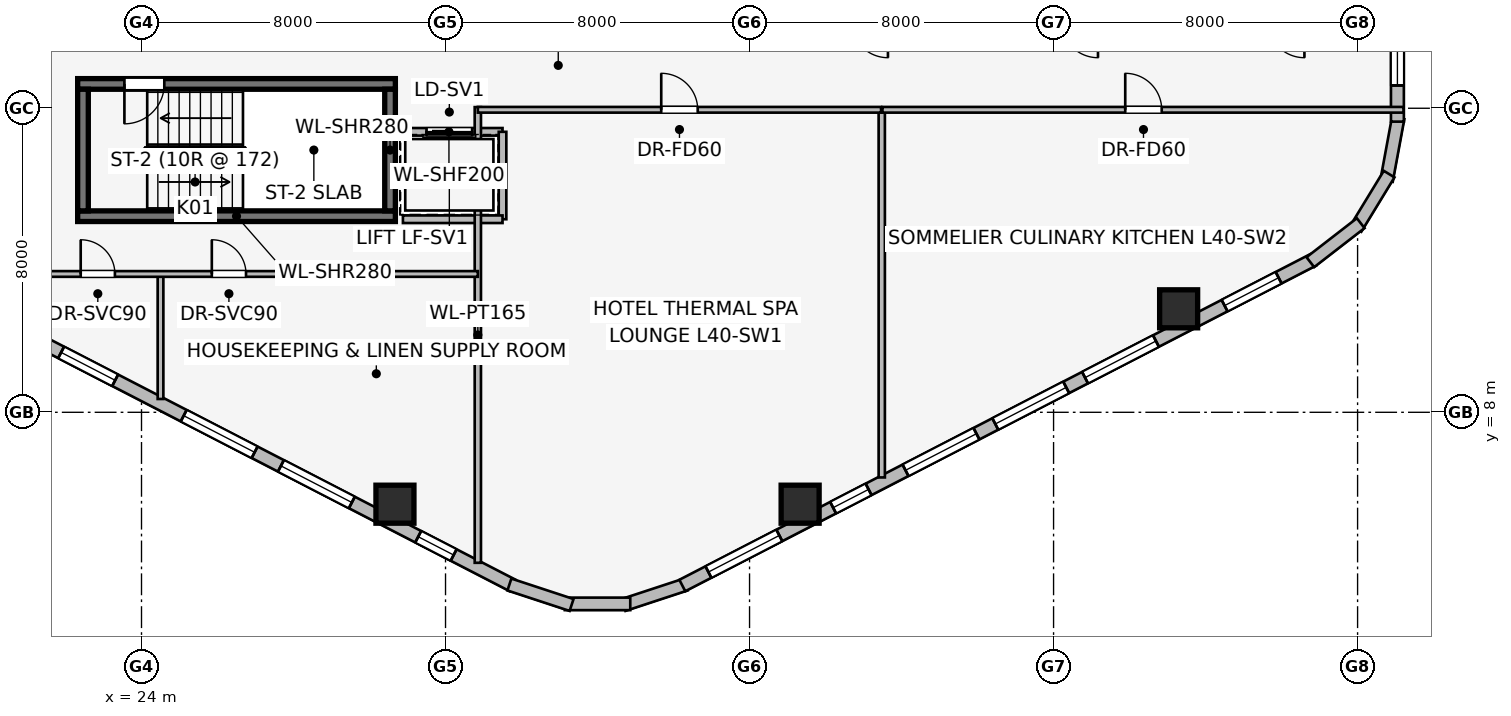
"""IFC4 building model, lengths in metres.
Left out: names, types, materials, properties, quantities, classifications, styles, units other than length and angle.
Written with IfcOpenShell. Run it as: python <this file> out.ifc"""

import sys

from ifc_helpers import new_model, si_unit, direction, frame, frame_2d, origin, origin_2d, place, context, subcontext, project, spatial, rectangle, extrude, element, fill, save


model = new_model("IFC4")
c1 = context("Model", 3, precision=1e-05, world=origin(), true_north=direction((0.0, 1.0)))
c2 = subcontext(c1, "Body", "Model", "MODEL_VIEW")
j1 = project(units=[si_unit("LENGTHUNIT", "METRE"), si_unit("PLANEANGLEUNIT", "RADIAN")], contexts=[c1])
p1 = place(None, origin())
s1 = spatial("IfcSite", under=j1, at=p1, CompositionType="ELEMENT")
p2 = place(p1, origin())
s2 = spatial("IfcBuilding", under=s1, at=p2, CompositionType="ELEMENT")
p3 = place(p2, frame((0.0, 0.0, 149.85)))
s3 = spatial("IfcBuildingStorey", under=s2, at=p3, CompositionType="ELEMENT", Elevation=149.85)
p4 = place(p3, frame((22.32, 13.16, 0.0), z_axis=(0.0, 0.0, 1.0), x_axis=(1.0, 0.0, 0.0)))
e1 = element("IfcWall", 1, at=p4, inside=s3, PredefinedType="SHEAR", context=c2, shape_type="SweptSolid", body=[
    extrude(rectangle(XDim=8.36, YDim=0.28, at=frame_2d((4.18, 0.0))), origin(), (0.0, 0.0, 1.0), 3.45),
])
p5 = place(p3, frame((30.68, 16.64, 0.0), z_axis=(0.0, 0.0, 1.0), x_axis=(-1.0, 0.0, 0.0)))
e2 = element("IfcWall", 2, at=p5, inside=s3, PredefinedType="SHEAR", context=c2, shape_type="SweptSolid", body=[
    extrude(rectangle(XDim=8.36, YDim=0.28, at=frame_2d((4.18, 0.0))), origin(), (0.0, 0.0, 1.0), 3.45),
])
p6 = place(p5, frame((6.08, 0.0, 0.0)))
e3 = element("IfcOpeningElement", 3, at=p6, cuts=e2, PredefinedType="OPENING", context=c2, shape_type="SweptSolid", body=[
    extrude(rectangle(XDim=1.05, YDim=2.0, at=frame_2d((0.525, 1.0))), frame((0.0, 0.15, 0.0), z_axis=(0.0, -1.0, 0.0), x_axis=(1.0, 0.0, 0.0)), (0.0, 0.0, 1.0), 0.3),
])
for number, where, z_axis, x_axis in (
    (4, (22.46, 16.5, 0.0), (0.0, 0.0, 1.0), (0.0, -1.0, 0.0)),
    (5, (30.54, 13.3, 0.0), (0.0, 0.0, 1.0), (0.0, 1.0, 0.0)),
):
    element("IfcWall", number, at=place(p3, frame(where, z_axis=z_axis, x_axis=x_axis)), inside=s3, PredefinedType="SHEAR", context=c2, shape_type="SweptSolid", body=[
        extrude(rectangle(XDim=3.2, YDim=0.28, at=frame_2d((1.6, 0.0))), origin(), (0.0, 0.0, 1.0), 3.45),
    ])
for number, where, z_axis, x_axis in (
    (6, (30.669, 5.582, 0.0), (0.0, 0.0, 1.0), (1.0, 0.0, 0.0)),
    (7, (41.331, 5.582, 0.0), (0.0, 0.0, 1.0), (1.0, 0.0, 0.0)),
    (8, (51.291, 10.723, 0.0), (0.0, 0.0, 1.0), (1.0, 0.0, 0.0)),
):
    element("IfcColumn", number, at=place(p3, frame(where, z_axis=z_axis, x_axis=x_axis)), inside=s3, PredefinedType="COLUMN", context=c2, shape_type="SweptSolid", body=[
        extrude(rectangle(XDim=1.0, YDim=1.0, at=origin_2d()), origin(), (0.0, 0.0, 1.0), 3.45),
    ])
p7 = place(p3, frame((33.769, 3.442, 0.0), z_axis=(0.0, 0.0, 1.0), x_axis=(-0.888613612362, 0.458656568606, 0.0)))
e9 = element("IfcWall", 9, at=p7, inside=s3, PredefinedType="STANDARD", context=c2, shape_type="SweptSolid", body=[
    extrude(rectangle(XDim=18.681, YDim=0.34, at=frame_2d((9.34, 0.0))), origin(), (0.0, 0.0, 1.0), 3.19),
])
p8 = place(p7, frame((1.75, 0.0, 0.75)))
e10 = element("IfcOpeningElement", 10, at=p8, cuts=e9, PredefinedType="OPENING", context=c2, shape_type="SweptSolid", body=[
    extrude(rectangle(XDim=1.05, YDim=1.4, at=frame_2d((0.525, 0.7))), frame((0.0, 0.18, 0.0), z_axis=(0.0, -1.0, 0.0), x_axis=(1.0, 0.0, 0.0)), (0.0, 0.0, 1.0), 0.36),
])
p9 = place(p7, frame((4.765, 0.0, 0.75)))
e11 = element("IfcOpeningElement", 11, at=p9, cuts=e9, PredefinedType="OPENING", context=c2, shape_type="SweptSolid", body=[
    extrude(rectangle(XDim=2.1, YDim=1.5, at=frame_2d((1.05, 0.75))), frame((0.0, 0.18, 0.0), z_axis=(0.0, -1.0, 0.0), x_axis=(1.0, 0.0, 0.0)), (0.0, 0.0, 1.0), 0.36),
])
p10 = place(p7, frame((7.644, 0.0, 0.75)))
e12 = element("IfcOpeningElement", 12, at=p10, cuts=e9, PredefinedType="OPENING", context=c2, shape_type="SweptSolid", body=[
    extrude(rectangle(XDim=2.1, YDim=1.5, at=frame_2d((1.05, 0.75))), frame((0.0, 0.18, 0.0), z_axis=(0.0, -1.0, 0.0), x_axis=(1.0, 0.0, 0.0)), (0.0, 0.0, 1.0), 0.36),
])
p11 = place(p7, frame((11.774, 0.0, 0.75)))
e13 = element("IfcOpeningElement", 13, at=p11, cuts=e9, PredefinedType="OPENING", context=c2, shape_type="SweptSolid", body=[
    extrude(rectangle(XDim=1.6, YDim=1.55, at=frame_2d((0.8, 0.775))), frame((0.0, 0.18, 0.0), z_axis=(0.0, -1.0, 0.0), x_axis=(1.0, 0.0, 0.0)), (0.0, 0.0, 1.0), 0.36),
])
p12 = place(p7, frame((15.92, 0.0, 0.75)))
e14 = element("IfcOpeningElement", 14, at=p12, cuts=e9, PredefinedType="OPENING", context=c2, shape_type="SweptSolid", body=[
    extrude(rectangle(XDim=1.05, YDim=1.4, at=frame_2d((0.525, 0.7))), frame((0.0, 0.18, 0.0), z_axis=(0.0, -1.0, 0.0), x_axis=(1.0, 0.0, 0.0)), (0.0, 0.0, 1.0), 0.36),
])
for number, where, z_axis, x_axis in (
    (15, (38.319, 3.468, 0.0), (0.0, 0.0, 1.0), (-0.95, -0.312, 0.0)),
    (16, (36.861, 2.959, 0.0), (0.0, 0.0, 1.0), (-1.0, 0.0, 0.0)),
    (17, (35.317, 2.93, 0.0), (0.0, 0.0, 1.0), (-0.95, 0.312, 0.0)),
):
    element("IfcWall", number, at=place(p3, frame(where, z_axis=z_axis, x_axis=x_axis)), inside=s3, PredefinedType="STANDARD", context=c2, shape_type="SweptSolid", body=[
        extrude(rectangle(XDim=1.722, YDim=0.33, at=frame_2d((0.861, 0.0))), origin(), (0.0, 0.0, 1.0), 3.19),
    ])
p13 = place(p3, frame((54.831, 12.01, 0.0), z_axis=(0.0, 0.0, 1.0), x_axis=(-0.888613612362, -0.458656568606, 0.0)))
e18 = element("IfcWall", 18, at=p13, inside=s3, PredefinedType="STANDARD", context=c2, shape_type="SweptSolid", body=[
    extrude(rectangle(XDim=18.681, YDim=0.34, at=frame_2d((9.34, 0.0))), origin(), (0.0, 0.0, 1.0), 3.19),
])
p14 = place(p13, frame((1.023, 0.0, 0.75)))
e19 = element("IfcOpeningElement", 19, at=p14, cuts=e18, PredefinedType="OPENING", context=c2, shape_type="SweptSolid", body=[
    extrude(rectangle(XDim=1.6, YDim=1.55, at=frame_2d((0.8, 0.775))), frame((0.0, 0.18, 0.0), z_axis=(0.0, -1.0, 0.0), x_axis=(1.0, 0.0, 0.0)), (0.0, 0.0, 1.0), 0.36),
])
p15 = place(p13, frame((4.655, 0.0, 0.75)))
e20 = element("IfcOpeningElement", 20, at=p15, cuts=e18, PredefinedType="OPENING", context=c2, shape_type="SweptSolid", body=[
    extrude(rectangle(XDim=2.1, YDim=1.5, at=frame_2d((1.05, 0.75))), frame((0.0, 0.18, 0.0), z_axis=(0.0, -1.0, 0.0), x_axis=(1.0, 0.0, 0.0)), (0.0, 0.0, 1.0), 0.36),
])
p16 = place(p13, frame((7.313, 0.0, 0.75)))
e21 = element("IfcOpeningElement", 21, at=p16, cuts=e18, PredefinedType="OPENING", context=c2, shape_type="SweptSolid", body=[
    extrude(rectangle(XDim=2.1, YDim=1.5, at=frame_2d((1.05, 0.75))), frame((0.0, 0.18, 0.0), z_axis=(0.0, -1.0, 0.0), x_axis=(1.0, 0.0, 0.0)), (0.0, 0.0, 1.0), 0.36),
])
p17 = place(p13, frame((9.971, 0.0, 0.75)))
e22 = element("IfcOpeningElement", 22, at=p17, cuts=e18, PredefinedType="OPENING", context=c2, shape_type="SweptSolid", body=[
    extrude(rectangle(XDim=2.1, YDim=1.5, at=frame_2d((1.05, 0.75))), frame((0.0, 0.18, 0.0), z_axis=(0.0, -1.0, 0.0), x_axis=(1.0, 0.0, 0.0)), (0.0, 0.0, 1.0), 0.36),
])
p18 = place(p13, frame((13.165, 0.0, 0.75)))
e23 = element("IfcOpeningElement", 23, at=p18, cuts=e18, PredefinedType="OPENING", context=c2, shape_type="SweptSolid", body=[
    extrude(rectangle(XDim=1.05, YDim=1.4, at=frame_2d((0.525, 0.7))), frame((0.0, 0.18, 0.0), z_axis=(0.0, -1.0, 0.0), x_axis=(1.0, 0.0, 0.0)), (0.0, 0.0, 1.0), 0.36),
])
p19 = place(p13, frame((15.808, 0.0, 0.75)))
e24 = element("IfcOpeningElement", 24, at=p19, cuts=e18, PredefinedType="OPENING", context=c2, shape_type="SweptSolid", body=[
    extrude(rectangle(XDim=2.1, YDim=1.5, at=frame_2d((1.05, 0.75))), frame((0.0, 0.18, 0.0), z_axis=(0.0, -1.0, 0.0), x_axis=(1.0, 0.0, 0.0)), (0.0, 0.0, 1.0), 0.36),
])
p20 = place(p3, frame((57.068, 15.742, 0.0), z_axis=(0.0, 0.0, 1.0), x_axis=(-0.181984991895, -0.983301308209, 0.0)))
e25 = element("IfcWall", 25, at=p20, inside=s3, PredefinedType="STANDARD", context=c2, shape_type="SweptSolid", body=[
    extrude(rectangle(XDim=1.677, YDim=0.33, at=frame_2d((0.838, 0.0))), origin(), (0.0, 0.0, 1.0), 3.19),
])
p21 = place(p3, frame((56.83, 14.268, 0.0), z_axis=(0.0, 0.0, 1.0), x_axis=(-0.520519429557, -0.853849824883, 0.0)))
e26 = element("IfcWall", 26, at=p21, inside=s3, PredefinedType="STANDARD", context=c2, shape_type="SweptSolid", body=[
    extrude(rectangle(XDim=1.677, YDim=0.33, at=frame_2d((0.839, 0.0))), origin(), (0.0, 0.0, 1.0), 3.19),
])
p22 = place(p3, frame((56.082, 12.976, 0.0), z_axis=(0.0, 0.0, 1.0), x_axis=(-0.790621329885, -0.612305408053, 0.0)))
e27 = element("IfcWall", 27, at=p22, inside=s3, PredefinedType="STANDARD", context=c2, shape_type="SweptSolid", body=[
    extrude(rectangle(XDim=1.676, YDim=0.33, at=frame_2d((0.838, 0.0))), origin(), (0.0, 0.0, 1.0), 3.19),
])
p23 = place(p3, frame((57.048, 32.352, 0.0), z_axis=(0.0, 0.0, 1.0), x_axis=(0.0, -1.0, 0.0)))
e28 = element("IfcWall", 28, at=p23, inside=s3, PredefinedType="STANDARD", context=c2, shape_type="SweptSolid", body=[
    extrude(rectangle(XDim=16.704, YDim=0.34, at=frame_2d((8.352, 0.0))), origin(), (0.0, 0.0, 1.0), 3.19),
])
p24 = place(p23, frame((0.992, 0.0, 0.75)))
e29 = element("IfcOpeningElement", 29, at=p24, cuts=e28, PredefinedType="OPENING", context=c2, shape_type="SweptSolid", body=[
    extrude(rectangle(XDim=1.05, YDim=1.4, at=frame_2d((0.525, 0.7))), frame((0.0, 0.18, 0.0), z_axis=(0.0, -1.0, 0.0), x_axis=(1.0, 0.0, 0.0)), (0.0, 0.0, 1.0), 0.36),
])
p25 = place(p23, frame((4.935, 0.0, 0.75)))
e30 = element("IfcOpeningElement", 30, at=p25, cuts=e28, PredefinedType="OPENING", context=c2, shape_type="SweptSolid", body=[
    extrude(rectangle(XDim=2.1, YDim=1.5, at=frame_2d((1.05, 0.75))), frame((0.0, 0.18, 0.0), z_axis=(0.0, -1.0, 0.0), x_axis=(1.0, 0.0, 0.0)), (0.0, 0.0, 1.0), 0.36),
])
p26 = place(p23, frame((9.919, 0.0, 0.75)))
e31 = element("IfcOpeningElement", 31, at=p26, cuts=e28, PredefinedType="OPENING", context=c2, shape_type="SweptSolid", body=[
    extrude(rectangle(XDim=1.6, YDim=1.55, at=frame_2d((0.8, 0.775))), frame((0.0, 0.18, 0.0), z_axis=(0.0, -1.0, 0.0), x_axis=(1.0, 0.0, 0.0)), (0.0, 0.0, 1.0), 0.36),
])
p27 = place(p23, frame((14.702, 0.0, 0.75)))
e32 = element("IfcOpeningElement", 32, at=p27, cuts=e28, PredefinedType="OPENING", context=c2, shape_type="SweptSolid", body=[
    extrude(rectangle(XDim=1.05, YDim=1.4, at=frame_2d((0.525, 0.7))), frame((0.0, 0.18, 0.0), z_axis=(0.0, -1.0, 0.0), x_axis=(1.0, 0.0, 0.0)), (0.0, 0.0, 1.0), 0.36),
])
p28 = place(p3, frame((33.5, 15.38, 0.0), z_axis=(0.0, 0.0, 1.0), x_axis=(-1.0, 0.0, 0.0)))
e33 = element("IfcWall", 33, at=p28, inside=s3, PredefinedType="PARTITIONING", context=c2, shape_type="SweptSolid", body=[
    extrude(rectangle(XDim=2.82, YDim=0.2, at=frame_2d((1.41, 0.0))), origin(), (0.0, 0.0, 1.0), 3.19),
])
p29 = place(p28, frame((0.8, 0.0, 0.0)))
e34 = element("IfcOpeningElement", 34, at=p29, cuts=e33, PredefinedType="OPENING", context=c2, shape_type="SweptSolid", body=[
    extrude(rectangle(XDim=1.2, YDim=2.2, at=frame_2d((0.6, 1.1))), frame((0.0, 0.11, 0.0), z_axis=(0.0, -1.0, 0.0), x_axis=(1.0, 0.0, 0.0)), (0.0, 0.0, 1.0), 0.22),
])
p30 = place(p3, frame((33.5, 13.08, 0.0), z_axis=(0.0, 0.0, 1.0), x_axis=(0.0, 1.0, 0.0)))
e35 = element("IfcWall", 35, at=p30, inside=s3, PredefinedType="PARTITIONING", context=c2, shape_type="SweptSolid", body=[
    extrude(rectangle(XDim=2.3, YDim=0.2, at=frame_2d((1.15, 0.0))), origin(), (0.0, 0.0, 1.0), 3.19),
])
p31 = place(p3, frame((30.879, 13.08, 0.0), z_axis=(0.0, 0.0, 1.0), x_axis=(1.0, 0.0, 0.0)))
e36 = element("IfcWall", 36, at=p31, inside=s3, PredefinedType="PARTITIONING", context=c2, shape_type="SweptSolid", body=[
    extrude(rectangle(XDim=2.621, YDim=0.2, at=frame_2d((1.311, 0.0))), origin(), (0.0, 0.0, 1.0), 3.19),
])
p32 = place(p3, frame((32.85, 4.04, 0.0), z_axis=(0.0, 0.0, 1.0), x_axis=(0.0, 1.0, 0.0)))
e37 = element("IfcWall", 37, at=p32, inside=s3, PredefinedType="PARTITIONING", context=c2, shape_type="SweptSolid", body=[
    extrude(rectangle(XDim=11.99, YDim=0.165, at=frame_2d((5.995, 0.0))), origin(), (0.0, 0.0, 1.0), 3.19),
])
p33 = place(p3, frame((24.5, 8.35, 0.0), z_axis=(0.0, 0.0, 1.0), x_axis=(0.0, 1.0, 0.0)))
e38 = element("IfcWall", 38, at=p33, inside=s3, PredefinedType="PARTITIONING", context=c2, shape_type="SweptSolid", body=[
    extrude(rectangle(XDim=3.29, YDim=0.15, at=frame_2d((1.645, 0.0))), origin(), (0.0, 0.0, 1.0), 3.19),
])
p34 = place(p3, frame((18.126, 11.64, 0.0), z_axis=(0.0, 0.0, 1.0), x_axis=(1.0, 0.0, 0.0)))
e39 = element("IfcWall", 39, at=p34, inside=s3, PredefinedType="PARTITIONING", context=c2, shape_type="SweptSolid", body=[
    extrude(rectangle(XDim=14.724, YDim=0.15, at=frame_2d((7.362, 0.0))), origin(), (0.0, 0.0, 1.0), 3.19),
])
p35 = place(p34, frame((4.274, 0.0, 0.0)))
e40 = element("IfcOpeningElement", 40, at=p35, cuts=e39, PredefinedType="OPENING", context=c2, shape_type="SweptSolid", body=[
    extrude(rectangle(XDim=0.9, YDim=2.0, at=frame_2d((0.45, 1.0))), frame((0.0, 0.085, 0.0), z_axis=(0.0, -1.0, 0.0), x_axis=(1.0, 0.0, 0.0)), (0.0, 0.0, 1.0), 0.17),
])
p36 = place(p34, frame((7.724, 0.0, 0.0)))
e41 = element("IfcOpeningElement", 41, at=p36, cuts=e39, PredefinedType="OPENING", context=c2, shape_type="SweptSolid", body=[
    extrude(rectangle(XDim=0.9, YDim=2.0, at=frame_2d((0.45, 1.0))), frame((0.0, 0.085, 0.0), z_axis=(0.0, -1.0, 0.0), x_axis=(1.0, 0.0, 0.0)), (0.0, 0.0, 1.0), 0.17),
])
p37 = place(p3, frame((43.479, 6.286, 0.0), z_axis=(0.0, 0.0, 1.0), x_axis=(0.0, 1.0, 0.0)))
e42 = element("IfcWall", 42, at=p37, inside=s3, PredefinedType="PARTITIONING", context=c2, shape_type="SweptSolid", body=[
    extrude(rectangle(XDim=9.644, YDim=0.165, at=frame_2d((4.822, 0.0))), origin(), (0.0, 0.0, 1.0), 3.19),
])
p38 = place(p3, frame((32.85, 15.96, 0.0), z_axis=(0.0, 0.0, 1.0), x_axis=(1.0, 0.0, 0.0)))
e43 = element("IfcWall", 43, at=p38, inside=s3, PredefinedType="PARTITIONING", context=c2, shape_type="SweptSolid", body=[
    extrude(rectangle(XDim=10.611, YDim=0.15, at=frame_2d((5.305, 0.0))), origin(), (0.0, 0.0, 1.0), 3.19),
])
p39 = place(p38, frame((4.826, 0.0, 0.0)))
e44 = element("IfcOpeningElement", 44, at=p39, cuts=e43, PredefinedType="OPENING", context=c2, shape_type="SweptSolid", body=[
    extrude(rectangle(XDim=0.96, YDim=2.0, at=frame_2d((0.48, 1.0))), frame((0.0, 0.085, 0.0), z_axis=(0.0, -1.0, 0.0), x_axis=(1.0, 0.0, 0.0)), (0.0, 0.0, 1.0), 0.17),
])
p40 = place(p3, frame((43.497, 15.96, 0.0), z_axis=(0.0, 0.0, 1.0), x_axis=(1.0, 0.0, 0.0)))
e45 = element("IfcWall", 45, at=p40, inside=s3, PredefinedType="PARTITIONING", context=c2, shape_type="SweptSolid", body=[
    extrude(rectangle(XDim=13.711, YDim=0.15, at=frame_2d((6.855, 0.0))), origin(), (0.0, 0.0, 1.0), 3.19),
])
p41 = place(p40, frame((6.389, 0.0, 0.0)))
e46 = element("IfcOpeningElement", 46, at=p41, cuts=e45, PredefinedType="OPENING", context=c2, shape_type="SweptSolid", body=[
    extrude(rectangle(XDim=0.96, YDim=2.0, at=frame_2d((0.48, 1.0))), frame((0.0, 0.085, 0.0), z_axis=(0.0, -1.0, 0.0), x_axis=(1.0, 0.0, 0.0)), (0.0, 0.0, 1.0), 0.17),
])
p42 = place(p8, origin())
e47 = element("IfcWindow", 47, at=p42, inside=s3, PartitioningType="SINGLE_PANEL", PredefinedType="WINDOW", context=c2, shape_type="SweptSolid", body=[
    extrude(rectangle(XDim=1.05, YDim=1.4, at=frame_2d((0.525, 0.7))), frame((0.0, 0.03, 0.0), z_axis=(0.0, -1.0, 0.0), x_axis=(1.0, 0.0, 0.0)), (0.0, 0.0, 1.0), 0.06),
])
fill(e10, e47)
p43 = place(p9, origin())
e48 = element("IfcWindow", 48, at=p43, inside=s3, PartitioningType="SINGLE_PANEL", PredefinedType="WINDOW", context=c2, shape_type="SweptSolid", body=[
    extrude(rectangle(XDim=2.1, YDim=1.5, at=frame_2d((1.05, 0.75))), frame((0.0, 0.03, 0.0), z_axis=(0.0, -1.0, 0.0), x_axis=(1.0, 0.0, 0.0)), (0.0, 0.0, 1.0), 0.06),
])
fill(e11, e48)
p44 = place(p10, origin())
e49 = element("IfcWindow", 49, at=p44, inside=s3, PartitioningType="SINGLE_PANEL", PredefinedType="WINDOW", context=c2, shape_type="SweptSolid", body=[
    extrude(rectangle(XDim=2.1, YDim=1.5, at=frame_2d((1.05, 0.75))), frame((0.0, 0.03, 0.0), z_axis=(0.0, -1.0, 0.0), x_axis=(1.0, 0.0, 0.0)), (0.0, 0.0, 1.0), 0.06),
])
fill(e12, e49)
p45 = place(p11, origin())
e50 = element("IfcWindow", 50, at=p45, inside=s3, PartitioningType="SINGLE_PANEL", PredefinedType="WINDOW", context=c2, shape_type="SweptSolid", body=[
    extrude(rectangle(XDim=1.6, YDim=1.55, at=frame_2d((0.8, 0.775))), frame((0.0, 0.03, 0.0), z_axis=(0.0, -1.0, 0.0), x_axis=(1.0, 0.0, 0.0)), (0.0, 0.0, 1.0), 0.06),
])
fill(e13, e50)
p46 = place(p14, origin())
e51 = element("IfcWindow", 51, at=p46, inside=s3, PartitioningType="SINGLE_PANEL", PredefinedType="WINDOW", context=c2, shape_type="SweptSolid", body=[
    extrude(rectangle(XDim=1.6, YDim=1.55, at=frame_2d((0.8, 0.775))), frame((0.0, 0.03, 0.0), z_axis=(0.0, -1.0, 0.0), x_axis=(1.0, 0.0, 0.0)), (0.0, 0.0, 1.0), 0.06),
])
fill(e19, e51)
p47 = place(p15, origin())
e52 = element("IfcWindow", 52, at=p47, inside=s3, PartitioningType="SINGLE_PANEL", PredefinedType="WINDOW", context=c2, shape_type="SweptSolid", body=[
    extrude(rectangle(XDim=2.1, YDim=1.5, at=frame_2d((1.05, 0.75))), frame((0.0, 0.03, 0.0), z_axis=(0.0, -1.0, 0.0), x_axis=(1.0, 0.0, 0.0)), (0.0, 0.0, 1.0), 0.06),
])
fill(e20, e52)
p48 = place(p16, origin())
e53 = element("IfcWindow", 53, at=p48, inside=s3, PartitioningType="SINGLE_PANEL", PredefinedType="WINDOW", context=c2, shape_type="SweptSolid", body=[
    extrude(rectangle(XDim=2.1, YDim=1.5, at=frame_2d((1.05, 0.75))), frame((0.0, 0.03, 0.0), z_axis=(0.0, -1.0, 0.0), x_axis=(1.0, 0.0, 0.0)), (0.0, 0.0, 1.0), 0.06),
])
fill(e21, e53)
p49 = place(p17, origin())
e54 = element("IfcWindow", 54, at=p49, inside=s3, PartitioningType="SINGLE_PANEL", PredefinedType="WINDOW", context=c2, shape_type="SweptSolid", body=[
    extrude(rectangle(XDim=2.1, YDim=1.5, at=frame_2d((1.05, 0.75))), frame((0.0, 0.03, 0.0), z_axis=(0.0, -1.0, 0.0), x_axis=(1.0, 0.0, 0.0)), (0.0, 0.0, 1.0), 0.06),
])
fill(e22, e54)
p50 = place(p18, origin())
e55 = element("IfcWindow", 55, at=p50, inside=s3, PartitioningType="SINGLE_PANEL", PredefinedType="WINDOW", context=c2, shape_type="SweptSolid", body=[
    extrude(rectangle(XDim=1.05, YDim=1.4, at=frame_2d((0.525, 0.7))), frame((0.0, 0.03, 0.0), z_axis=(0.0, -1.0, 0.0), x_axis=(1.0, 0.0, 0.0)), (0.0, 0.0, 1.0), 0.06),
])
fill(e23, e55)
p51 = place(p19, origin())
e56 = element("IfcWindow", 56, at=p51, inside=s3, PartitioningType="SINGLE_PANEL", PredefinedType="WINDOW", context=c2, shape_type="SweptSolid", body=[
    extrude(rectangle(XDim=2.1, YDim=1.5, at=frame_2d((1.05, 0.75))), frame((0.0, 0.03, 0.0), z_axis=(0.0, -1.0, 0.0), x_axis=(1.0, 0.0, 0.0)), (0.0, 0.0, 1.0), 0.06),
])
fill(e24, e56)
p52 = place(p27, origin())
e57 = element("IfcWindow", 57, at=p52, inside=s3, PartitioningType="SINGLE_PANEL", PredefinedType="WINDOW", context=c2, shape_type="SweptSolid", body=[
    extrude(rectangle(XDim=1.05, YDim=1.4, at=frame_2d((0.525, 0.7))), frame((0.0, 0.03, 0.0), z_axis=(0.0, -1.0, 0.0), x_axis=(1.0, 0.0, 0.0)), (0.0, 0.0, 1.0), 0.06),
])
fill(e32, e57)
p53 = place(p6, origin())
e58 = element("IfcDoor", 58, at=p53, inside=s3, OperationType="SINGLE_SWING_RIGHT", PredefinedType="DOOR", context=c2, shape_type="SweptSolid", body=[
    extrude(rectangle(XDim=1.05, YDim=2.0, at=frame_2d((0.525, 1.0))), frame((0.0, 0.025, 0.0), z_axis=(0.0, -1.0, 0.0), x_axis=(1.0, 0.0, 0.0)), (0.0, 0.0, 1.0), 0.05),
])
fill(e3, e58)
p54 = place(p29, origin())
e59 = element("IfcDoor", 59, at=p54, inside=s3, OperationType="SLIDING_TO_RIGHT", PredefinedType="DOOR", context=c2, shape_type="SweptSolid", body=[
    extrude(rectangle(XDim=1.2, YDim=2.2, at=frame_2d((0.6, 1.1))), frame((0.0, 0.025, 0.0), z_axis=(0.0, -1.0, 0.0), x_axis=(1.0, 0.0, 0.0)), (0.0, 0.0, 1.0), 0.05),
])
fill(e34, e59)
p55 = place(p35, origin())
e60 = element("IfcDoor", 60, at=p55, inside=s3, OperationType="SINGLE_SWING_LEFT", PredefinedType="DOOR", context=c2, shape_type="SweptSolid", body=[
    extrude(rectangle(XDim=0.9, YDim=2.0, at=frame_2d((0.45, 1.0))), frame((0.0, 0.025, 0.0), z_axis=(0.0, -1.0, 0.0), x_axis=(1.0, 0.0, 0.0)), (0.0, 0.0, 1.0), 0.05),
])
fill(e40, e60)
p56 = place(p36, origin())
e61 = element("IfcDoor", 61, at=p56, inside=s3, OperationType="SINGLE_SWING_LEFT", PredefinedType="DOOR", context=c2, shape_type="SweptSolid", body=[
    extrude(rectangle(XDim=0.9, YDim=2.0, at=frame_2d((0.45, 1.0))), frame((0.0, 0.025, 0.0), z_axis=(0.0, -1.0, 0.0), x_axis=(1.0, 0.0, 0.0)), (0.0, 0.0, 1.0), 0.05),
])
fill(e41, e61)
p57 = place(p39, origin())
e62 = element("IfcDoor", 62, at=p57, inside=s3, OperationType="SINGLE_SWING_LEFT", PredefinedType="DOOR", context=c2, shape_type="SweptSolid", body=[
    extrude(rectangle(XDim=0.96, YDim=2.0, at=frame_2d((0.48, 1.0))), frame((0.0, 0.025, 0.0), z_axis=(0.0, -1.0, 0.0), x_axis=(1.0, 0.0, 0.0)), (0.0, 0.0, 1.0), 0.05),
])
fill(e44, e62)
p58 = place(p41, origin())
e63 = element("IfcDoor", 63, at=p58, inside=s3, OperationType="SINGLE_SWING_LEFT", PredefinedType="DOOR", context=c2, shape_type="SweptSolid", body=[
    extrude(rectangle(XDim=0.96, YDim=2.0, at=frame_2d((0.48, 1.0))), frame((0.0, 0.025, 0.0), z_axis=(0.0, -1.0, 0.0), x_axis=(1.0, 0.0, 0.0)), (0.0, 0.0, 1.0), 0.05),
])
fill(e46, e63)
save(model, sys.argv[1])
